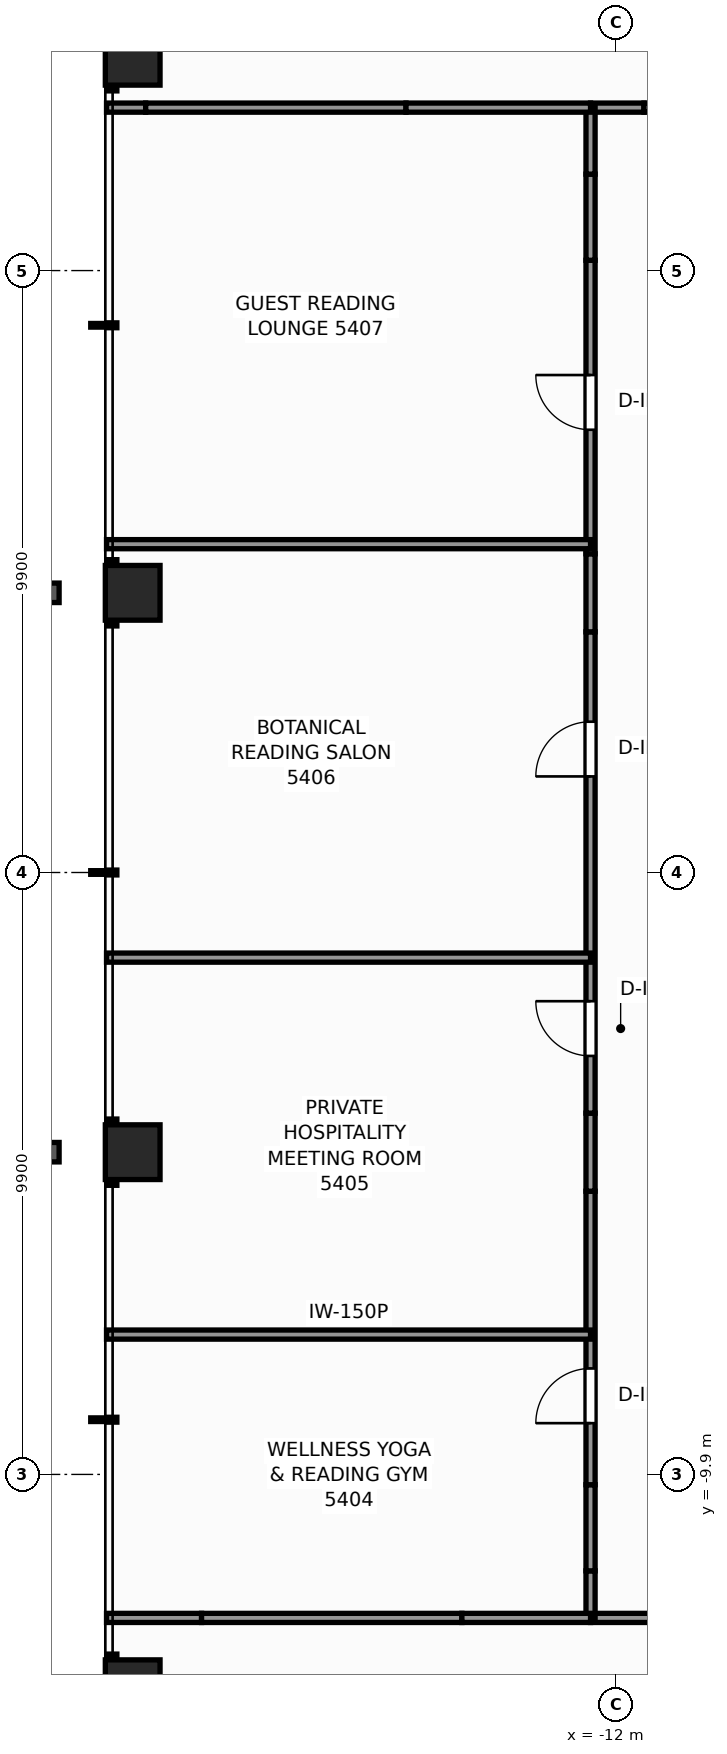
"""IFC4 building model, lengths in metres.
Left out: names, types, materials, properties, quantities, classifications, styles, units other than length and angle.
Written with IfcOpenShell. Run it as: python <this file> out.ifc"""

import sys

from ifc_helpers import new_model, si_unit, direction, frame, frame_2d, origin, origin_2d, place, context, subcontext, project, spatial, rectangle, extrude, element, fill, save


model = new_model("IFC4")
c1 = context("Model", 3, precision=1e-05, world=origin(), true_north=direction((0.0, 1.0)))
c2 = subcontext(c1, "Body", "Model", "MODEL_VIEW")
j1 = project(units=[si_unit("LENGTHUNIT", "METRE"), si_unit("PLANEANGLEUNIT", "RADIAN")], contexts=[c1])
p1 = place(None, origin())
s1 = spatial("IfcSite", under=j1, at=p1, CompositionType="ELEMENT")
p2 = place(p1, origin())
s2 = spatial("IfcBuilding", under=s1, at=p2, CompositionType="ELEMENT")
p3 = place(p2, frame((0.0, 0.0, 186.6)))
s3 = spatial("IfcBuildingStorey", under=s2, at=p3, CompositionType="ELEMENT", Elevation=186.6)
for number, where, z_axis, x_axis in (
    (1, (-19.95, -13.4, 0.0), (0.0, 0.0, 1.0), (1.0, 0.0, 0.0)),
    (2, (-19.95, -4.6, 0.0), (0.0, 0.0, 1.0), (1.0, 0.0, 0.0)),
    (3, (-19.95, 4.6, 0.0), (0.0, 0.0, 1.0), (1.0, 0.0, 0.0)),
    (4, (-19.95, 13.4, 0.0), (0.0, 0.0, 1.0), (1.0, 0.0, 0.0)),
):
    element("IfcColumn", number, at=place(p3, frame(where, z_axis=z_axis, x_axis=x_axis)), inside=s3, PredefinedType="COLUMN", context=c2, shape_type="SweptSolid", body=[
        extrude(rectangle(XDim=0.9, YDim=0.9, at=origin_2d()), origin(), (0.0, 0.0, 1.0), 3.3),
    ])
p4 = place(p3, frame((-12.42, -12.26, 0.0), z_axis=(0.0, 0.0, 1.0), x_axis=(1.0, 0.0, 0.0)))
e5 = element("IfcWall", 5, at=p4, inside=s3, PredefinedType="PARTITIONING", context=c2, shape_type="SweptSolid", body=[
    extrude(rectangle(XDim=0.99, YDim=0.15, at=frame_2d((0.495, 0.0))), origin(), (0.0, 0.0, 1.0), 3.08),
])
p5 = place(p3, frame((-12.42, 12.58, 0.0), z_axis=(0.0, 0.0, 1.0), x_axis=(1.0, 0.0, 0.0)))
e6 = element("IfcWall", 6, at=p5, inside=s3, PredefinedType="PARTITIONING", context=c2, shape_type="SweptSolid", body=[
    extrude(rectangle(XDim=0.878, YDim=0.15, at=frame_2d((0.439, 0.0))), origin(), (0.0, 0.0, 1.0), 3.08),
])
p6 = place(p3, frame((-11.542, 12.58, 0.0), z_axis=(0.0, 0.0, 1.0), x_axis=(1.0, 0.0, 0.0)))
e7 = element("IfcWall", 7, at=p6, inside=s3, PredefinedType="PARTITIONING", context=c2, shape_type="SweptSolid", body=[
    extrude(rectangle(XDim=1.417, YDim=0.15, at=frame_2d((0.708, 0.0))), origin(), (0.0, 0.0, 1.0), 1.265),
])
p7 = place(p3, frame((-12.42, -12.26, 0.0), z_axis=(0.0, 0.0, 1.0), x_axis=(0.0, 1.0, 0.0)))
e8 = element("IfcWall", 8, at=p7, inside=s3, PredefinedType="PARTITIONING", context=c2, shape_type="SweptSolid", body=[
    extrude(rectangle(XDim=0.774, YDim=0.15, at=frame_2d((0.387, 0.0))), origin(), (0.0, 0.0, 1.0), 3.08),
])
p8 = place(p3, frame((-12.42, -11.486, 0.0), z_axis=(0.0, 0.0, 1.0), x_axis=(0.0, 1.0, 0.0)))
e9 = element("IfcWall", 9, at=p8, inside=s3, PredefinedType="PARTITIONING", context=c2, shape_type="SweptSolid", body=[
    extrude(rectangle(XDim=1.417, YDim=0.15, at=frame_2d((0.708, 0.0))), origin(), (0.0, 0.0, 1.0), 1.265),
])
p9 = place(p3, frame((-12.42, -10.069, 0.0), z_axis=(0.0, 0.0, 1.0), x_axis=(0.0, 1.0, 0.0)))
e10 = element("IfcWall", 10, at=p9, inside=s3, PredefinedType="PARTITIONING", context=c2, shape_type="SweptSolid", body=[
    extrude(rectangle(XDim=4.827, YDim=0.15, at=frame_2d((2.414, 0.0))), origin(), (0.0, 0.0, 1.0), 3.08),
])
p10 = place(p9, frame((1.012, 0.0, 0.0)))
e11 = element("IfcOpeningElement", 11, at=p10, cuts=e10, PredefinedType="OPENING", context=c2, shape_type="SweptSolid", body=[
    extrude(rectangle(XDim=0.9, YDim=2.06, at=frame_2d((0.45, 1.03))), frame((0.0, 0.085, 0.0), z_axis=(0.0, -1.0, 0.0), x_axis=(1.0, 0.0, 0.0)), (0.0, 0.0, 1.0), 0.17),
])
p11 = place(p3, frame((-12.42, -5.242, 0.0), z_axis=(0.0, 0.0, 1.0), x_axis=(0.0, 1.0, 0.0)))
e12 = element("IfcWall", 12, at=p11, inside=s3, PredefinedType="PARTITIONING", context=c2, shape_type="SweptSolid", body=[
    extrude(rectangle(XDim=1.284, YDim=0.15, at=frame_2d((0.642, 0.0))), origin(), (0.0, 0.0, 1.0), 1.265),
])
p12 = place(p3, frame((-12.42, -3.958, 0.0), z_axis=(0.0, 0.0, 1.0), x_axis=(0.0, 1.0, 0.0)))
e13 = element("IfcWall", 13, at=p12, inside=s3, PredefinedType="PARTITIONING", context=c2, shape_type="SweptSolid", body=[
    extrude(rectangle(XDim=7.916, YDim=0.15, at=frame_2d((3.958, 0.0))), origin(), (0.0, 0.0, 1.0), 2.369),
])
p13 = place(p12, frame((0.941, 0.0, 0.0)))
e14 = element("IfcOpeningElement", 14, at=p13, cuts=e13, PredefinedType="OPENING", context=c2, shape_type="SweptSolid", body=[
    extrude(rectangle(XDim=0.9, YDim=2.06, at=frame_2d((0.45, 1.03))), frame((0.0, 0.085, 0.0), z_axis=(0.0, -1.0, 0.0), x_axis=(1.0, 0.0, 0.0)), (0.0, 0.0, 1.0), 0.17),
])
p14 = place(p12, frame((5.538, 0.0, 0.0)))
e15 = element("IfcOpeningElement", 15, at=p14, cuts=e13, PredefinedType="OPENING", context=c2, shape_type="SweptSolid", body=[
    extrude(rectangle(XDim=0.9, YDim=2.06, at=frame_2d((0.45, 1.03))), frame((0.0, 0.085, 0.0), z_axis=(0.0, -1.0, 0.0), x_axis=(1.0, 0.0, 0.0)), (0.0, 0.0, 1.0), 0.17),
])
p15 = place(p3, frame((-12.42, 3.958, 0.0), z_axis=(0.0, 0.0, 1.0), x_axis=(0.0, 1.0, 0.0)))
e16 = element("IfcWall", 16, at=p15, inside=s3, PredefinedType="PARTITIONING", context=c2, shape_type="SweptSolid", body=[
    extrude(rectangle(XDim=1.284, YDim=0.15, at=frame_2d((0.642, 0.0))), origin(), (0.0, 0.0, 1.0), 1.265),
])
p16 = place(p3, frame((-12.42, 5.242, 0.0), z_axis=(0.0, 0.0, 1.0), x_axis=(0.0, 1.0, 0.0)))
e17 = element("IfcWall", 17, at=p16, inside=s3, PredefinedType="PARTITIONING", context=c2, shape_type="SweptSolid", body=[
    extrude(rectangle(XDim=4.827, YDim=0.15, at=frame_2d((2.414, 0.0))), origin(), (0.0, 0.0, 1.0), 3.08),
])
p17 = place(p16, frame((2.04, 0.0, 0.0)))
e18 = element("IfcOpeningElement", 18, at=p17, cuts=e17, PredefinedType="OPENING", context=c2, shape_type="SweptSolid", body=[
    extrude(rectangle(XDim=0.9, YDim=2.06, at=frame_2d((0.45, 1.03))), frame((0.0, 0.085, 0.0), z_axis=(0.0, -1.0, 0.0), x_axis=(1.0, 0.0, 0.0)), (0.0, 0.0, 1.0), 0.17),
])
p18 = place(p3, frame((-12.42, 10.069, 0.0), z_axis=(0.0, 0.0, 1.0), x_axis=(0.0, 1.0, 0.0)))
e19 = element("IfcWall", 19, at=p18, inside=s3, PredefinedType="PARTITIONING", context=c2, shape_type="SweptSolid", body=[
    extrude(rectangle(XDim=1.417, YDim=0.15, at=frame_2d((0.708, 0.0))), origin(), (0.0, 0.0, 1.0), 1.265),
])
p19 = place(p3, frame((-12.42, 11.486, 0.0), z_axis=(0.0, 0.0, 1.0), x_axis=(0.0, 1.0, 0.0)))
e20 = element("IfcWall", 20, at=p19, inside=s3, PredefinedType="PARTITIONING", context=c2, shape_type="SweptSolid", body=[
    extrude(rectangle(XDim=1.094, YDim=0.15, at=frame_2d((0.547, 0.0))), origin(), (0.0, 0.0, 1.0), 3.08),
])
p20 = place(p3, frame((-20.38, -12.26, 0.0), z_axis=(0.0, 0.0, 1.0), x_axis=(1.0, 0.0, 0.0)))
e21 = element("IfcWall", 21, at=p20, inside=s3, PredefinedType="PARTITIONING", context=c2, shape_type="SweptSolid", body=[
    extrude(rectangle(XDim=1.563, YDim=0.15, at=frame_2d((0.781, 0.0))), origin(), (0.0, 0.0, 1.0), 2.453),
])
p21 = place(p3, frame((-18.817, -12.26, 0.0), z_axis=(0.0, 0.0, 1.0), x_axis=(1.0, 0.0, 0.0)))
e22 = element("IfcWall", 22, at=p21, inside=s3, PredefinedType="PARTITIONING", context=c2, shape_type="SweptSolid", body=[
    extrude(rectangle(XDim=4.281, YDim=0.15, at=frame_2d((2.141, 0.0))), origin(), (0.0, 0.0, 1.0), 1.265),
])
p22 = place(p3, frame((-14.536, -12.26, 0.0), z_axis=(0.0, 0.0, 1.0), x_axis=(1.0, 0.0, 0.0)))
e23 = element("IfcWall", 23, at=p22, inside=s3, PredefinedType="PARTITIONING", context=c2, shape_type="SweptSolid", body=[
    extrude(rectangle(XDim=2.116, YDim=0.15, at=frame_2d((1.058, 0.0))), origin(), (0.0, 0.0, 1.0), 3.08),
])
p23 = place(p3, frame((-20.38, 12.58, 0.0), z_axis=(0.0, 0.0, 1.0), x_axis=(1.0, 0.0, 0.0)))
e24 = element("IfcWall", 24, at=p23, inside=s3, PredefinedType="PARTITIONING", context=c2, shape_type="SweptSolid", body=[
    extrude(rectangle(XDim=0.644, YDim=0.15, at=frame_2d((0.322, 0.0))), origin(), (0.0, 0.0, 1.0), 2.453),
])
p24 = place(p3, frame((-19.736, 12.58, 0.0), z_axis=(0.0, 0.0, 1.0), x_axis=(1.0, 0.0, 0.0)))
e25 = element("IfcWall", 25, at=p24, inside=s3, PredefinedType="PARTITIONING", context=c2, shape_type="SweptSolid", body=[
    extrude(rectangle(XDim=4.281, YDim=0.15, at=frame_2d((2.141, 0.0))), origin(), (0.0, 0.0, 1.0), 1.265),
])
p25 = place(p3, frame((-15.455, 12.58, 0.0), z_axis=(0.0, 0.0, 1.0), x_axis=(1.0, 0.0, 0.0)))
e26 = element("IfcWall", 26, at=p25, inside=s3, PredefinedType="PARTITIONING", context=c2, shape_type="SweptSolid", body=[
    extrude(rectangle(XDim=3.035, YDim=0.15, at=frame_2d((1.518, 0.0))), origin(), (0.0, 0.0, 1.0), 3.08),
])
for number, where, z_axis, x_axis in (
    (27, (-20.38, -7.6, 0.0), (0.0, 0.0, 1.0), (1.0, 0.0, 0.0)),
    (28, (-20.38, -1.4, 0.0), (0.0, 0.0, 1.0), (1.0, 0.0, 0.0)),
    (29, (-20.38, 5.4, 0.0), (0.0, 0.0, 1.0), (1.0, 0.0, 0.0)),
):
    element("IfcWall", number, at=place(p3, frame(where, z_axis=z_axis, x_axis=x_axis)), inside=s3, PredefinedType="PARTITIONING", context=c2, shape_type="SweptSolid", body=[
        extrude(rectangle(XDim=7.96, YDim=0.15, at=frame_2d((3.98, 0.0))), origin(), (0.0, 0.0, 1.0), 2.453),
    ])
p26 = place(p10, origin())
e30 = element("IfcDoor", 30, at=p26, inside=s3, OperationType="SINGLE_SWING_LEFT", PredefinedType="DOOR", context=c2, shape_type="SweptSolid", body=[
    extrude(rectangle(XDim=0.9, YDim=2.06, at=frame_2d((0.45, 1.03))), frame((0.0, 0.025, 0.0), z_axis=(0.0, -1.0, 0.0), x_axis=(1.0, 0.0, 0.0)), (0.0, 0.0, 1.0), 0.05),
])
fill(e11, e30)
p27 = place(p13, origin())
e31 = element("IfcDoor", 31, at=p27, inside=s3, OperationType="SINGLE_SWING_RIGHT", PredefinedType="DOOR", context=c2, shape_type="SweptSolid", body=[
    extrude(rectangle(XDim=0.9, YDim=2.06, at=frame_2d((0.45, 1.03))), frame((0.0, 0.025, 0.0), z_axis=(0.0, -1.0, 0.0), x_axis=(1.0, 0.0, 0.0)), (0.0, 0.0, 1.0), 0.05),
])
fill(e14, e31)
p28 = place(p14, origin())
e32 = element("IfcDoor", 32, at=p28, inside=s3, OperationType="SINGLE_SWING_LEFT", PredefinedType="DOOR", context=c2, shape_type="SweptSolid", body=[
    extrude(rectangle(XDim=0.9, YDim=2.06, at=frame_2d((0.45, 1.03))), frame((0.0, 0.025, 0.0), z_axis=(0.0, -1.0, 0.0), x_axis=(1.0, 0.0, 0.0)), (0.0, 0.0, 1.0), 0.05),
])
fill(e15, e32)
p29 = place(p17, origin())
e33 = element("IfcDoor", 33, at=p29, inside=s3, OperationType="SINGLE_SWING_RIGHT", PredefinedType="DOOR", context=c2, shape_type="SweptSolid", body=[
    extrude(rectangle(XDim=0.9, YDim=2.06, at=frame_2d((0.45, 1.03))), frame((0.0, 0.025, 0.0), z_axis=(0.0, -1.0, 0.0), x_axis=(1.0, 0.0, 0.0)), (0.0, 0.0, 1.0), 0.05),
])
fill(e18, e33)
save(model, sys.argv[1])
